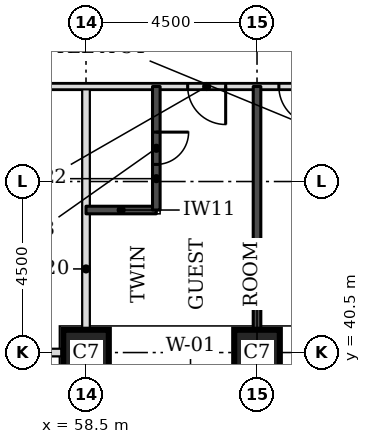
"""IFC4 building model, lengths in metres.
Left out: names, types, materials, properties, quantities, classifications, styles, units other than length and angle.
Written with IfcOpenShell. Run it as: python <this file> out.ifc"""

import sys

from ifc_helpers import new_model, si_unit, direction, frame, frame_2d, origin, origin_2d, place, context, subcontext, project, spatial, rectangle, extrude, element, fill, save


model = new_model("IFC4")
c1 = context("Model", 3, precision=1e-05, world=origin(), true_north=direction((0.0, 1.0)))
c2 = subcontext(c1, "Body", "Model", "MODEL_VIEW")
j1 = project(units=[si_unit("LENGTHUNIT", "METRE"), si_unit("PLANEANGLEUNIT", "RADIAN")], contexts=[c1])
p1 = place(None, origin())
s1 = spatial("IfcSite", under=j1, at=p1, CompositionType="ELEMENT")
p2 = place(p1, origin())
s2 = spatial("IfcBuilding", under=s1, at=p2, CompositionType="ELEMENT")
p3 = place(p2, frame((0.0, 0.0, 26.4)))
s3 = spatial("IfcBuildingStorey", under=s2, at=p3, CompositionType="ELEMENT", Elevation=26.4)
for number, where, z_axis, x_axis in (
    (1, (58.5, 40.5, 0.0), (0.0, 0.0, 1.0), (1.0, 0.0, 0.0)),
    (2, (63.0, 40.5, 0.0), (0.0, 0.0, 1.0), (1.0, 0.0, 0.0)),
):
    element("IfcColumn", number, at=place(p3, frame(where, z_axis=z_axis, x_axis=x_axis)), inside=s3, PredefinedType="COLUMN", context=c2, shape_type="SweptSolid", body=[
        extrude(rectangle(XDim=1.2, YDim=1.2, at=origin_2d()), origin(), (0.0, 0.0, 1.0), 3.3),
    ])
p4 = place(p3, frame((51.5, 40.5, 0.0), z_axis=(0.0, 0.0, 1.0), x_axis=(1.0, 0.0, 0.0)))
e3 = element("IfcWall", 3, at=p4, inside=s3, PredefinedType="PARTITIONING", context=c2, shape_type="SweptSolid", body=[
    extrude(rectangle(XDim=6.4, YDim=0.2, at=frame_2d((3.2, 0.0))), origin(), (0.0, 0.0, 1.0), 2.33),
])
p5 = place(p3, frame((58.5, 41.1, 0.0), z_axis=(0.0, 0.0, 1.0), x_axis=(0.0, 1.0, 0.0)))
e4 = element("IfcWall", 4, at=p5, inside=s3, PredefinedType="PARTITIONING", context=c2, shape_type="SweptSolid", body=[
    extrude(rectangle(XDim=6.4, YDim=0.2, at=frame_2d((3.2, 0.0))), origin(), (0.0, 0.0, 1.0), 3.08),
])
p6 = place(p3, frame((51.5, 47.5, 0.0), z_axis=(0.0, 0.0, 1.0), x_axis=(1.0, 0.0, 0.0)))
e5 = element("IfcWall", 5, at=p6, inside=s3, PredefinedType="PARTITIONING", context=c2, shape_type="SweptSolid", body=[
    extrude(rectangle(XDim=18.0, YDim=0.15, at=frame_2d((9.0, 0.0))), origin(), (0.0, 0.0, 1.0), 3.08),
])
p7 = place(p6, frame((12.075, 0.0, 0.0)))
e6 = element("IfcOpeningElement", 6, at=p7, cuts=e5, PredefinedType="OPENING", context=c2, shape_type="SweptSolid", body=[
    extrude(rectangle(XDim=1.0, YDim=2.1, at=frame_2d((0.5, 1.05))), frame((0.0, 0.085, 0.0), z_axis=(0.0, -1.0, 0.0), x_axis=(1.0, 0.0, 0.0)), (0.0, 0.0, 1.0), 0.17),
])
p8 = place(p6, frame((9.675, 0.0, 0.0)))
e7 = element("IfcOpeningElement", 7, at=p8, cuts=e5, PredefinedType="OPENING", context=c2, shape_type="SweptSolid", body=[
    extrude(rectangle(XDim=1.0, YDim=2.1, at=frame_2d((0.5, 1.05))), frame((0.0, 0.085, 0.0), z_axis=(0.0, -1.0, 0.0), x_axis=(1.0, 0.0, 0.0)), (0.0, 0.0, 1.0), 0.17),
])
p9 = place(p6, frame((16.5, 0.0, 0.0)))
e8 = element("IfcOpeningElement", 8, at=p9, cuts=e5, PredefinedType="OPENING", context=c2, shape_type="SweptSolid", body=[
    extrude(rectangle(XDim=1.0, YDim=2.1, at=frame_2d((0.5, 1.05))), frame((0.0, 0.085, 0.0), z_axis=(0.0, -1.0, 0.0), x_axis=(1.0, 0.0, 0.0)), (0.0, 0.0, 1.0), 0.17),
])
p10 = place(p3, frame((63.0, 41.1, 0.0), z_axis=(0.0, 0.0, 1.0), x_axis=(0.0, 1.0, 0.0)))
e9 = element("IfcWall", 9, at=p10, inside=s3, PredefinedType="SOLIDWALL", context=c2, shape_type="SweptSolid", body=[
    extrude(rectangle(XDim=6.4, YDim=0.2, at=frame_2d((3.2, 0.0))), origin(), (0.0, 0.0, 1.0), 3.08),
])
p11 = place(p3, frame((58.5, 44.25, 0.0), z_axis=(0.0, 0.0, 1.0), x_axis=(1.0, 0.0, 0.0)))
e10 = element("IfcWall", 10, at=p11, inside=s3, PredefinedType="SOLIDWALL", context=c2, shape_type="SweptSolid", body=[
    extrude(rectangle(XDim=1.85, YDim=0.2, at=frame_2d((0.925, 0.0))), origin(), (0.0, 0.0, 1.0), 3.08),
])
p12 = place(p3, frame((60.35, 44.25, 0.0), z_axis=(0.0, 0.0, 1.0), x_axis=(0.0, 1.0, 0.0)))
e11 = element("IfcWall", 11, at=p12, inside=s3, PredefinedType="SOLIDWALL", context=c2, shape_type="SweptSolid", body=[
    extrude(rectangle(XDim=3.25, YDim=0.2, at=frame_2d((1.625, 0.0))), origin(), (0.0, 0.0, 1.0), 3.08),
])
p13 = place(p12, frame((1.2, 0.0, 0.0)))
e12 = element("IfcOpeningElement", 12, at=p13, cuts=e11, PredefinedType="OPENING", context=c2, shape_type="SweptSolid", body=[
    extrude(rectangle(XDim=0.85, YDim=2.1, at=frame_2d((0.425, 1.05))), frame((0.0, 0.11, 0.0), z_axis=(0.0, -1.0, 0.0), x_axis=(1.0, 0.0, 0.0)), (0.0, 0.0, 1.0), 0.22),
])
p14 = place(p7, frame((1.0, 0.0, 0.0), z_axis=(0.0, 0.0, 1.0), x_axis=(-1.0, 0.0, 0.0)))
e13 = element("IfcDoor", 13, at=p14, inside=s3, OperationType="SINGLE_SWING_LEFT", PredefinedType="DOOR", context=c2, shape_type="SweptSolid", body=[
    extrude(rectangle(XDim=1.0, YDim=2.1, at=frame_2d((0.5, 1.05))), frame((0.0, 0.025, 0.0), z_axis=(0.0, -1.0, 0.0), x_axis=(1.0, 0.0, 0.0)), (0.0, 0.0, 1.0), 0.05),
])
fill(e6, e13)
p15 = place(p8, frame((1.0, 0.0, 0.0), z_axis=(0.0, 0.0, 1.0), x_axis=(-1.0, 0.0, 0.0)))
e14 = element("IfcDoor", 14, at=p15, inside=s3, OperationType="SINGLE_SWING_LEFT", PredefinedType="DOOR", context=c2, shape_type="SweptSolid", body=[
    extrude(rectangle(XDim=1.0, YDim=2.1, at=frame_2d((0.5, 1.05))), frame((0.0, 0.025, 0.0), z_axis=(0.0, -1.0, 0.0), x_axis=(1.0, 0.0, 0.0)), (0.0, 0.0, 1.0), 0.05),
])
fill(e7, e14)
p16 = place(p13, frame((0.85, 0.0, 0.0), z_axis=(0.0, 0.0, 1.0), x_axis=(-1.0, 0.0, 0.0)))
e15 = element("IfcDoor", 15, at=p16, inside=s3, OperationType="SINGLE_SWING_LEFT", PredefinedType="DOOR", context=c2, shape_type="SweptSolid", body=[
    extrude(rectangle(XDim=0.85, YDim=2.1, at=frame_2d((0.425, 1.05))), frame((0.0, 0.025, 0.0), z_axis=(0.0, -1.0, 0.0), x_axis=(1.0, 0.0, 0.0)), (0.0, 0.0, 1.0), 0.05),
])
fill(e12, e15)
save(model, sys.argv[1])
